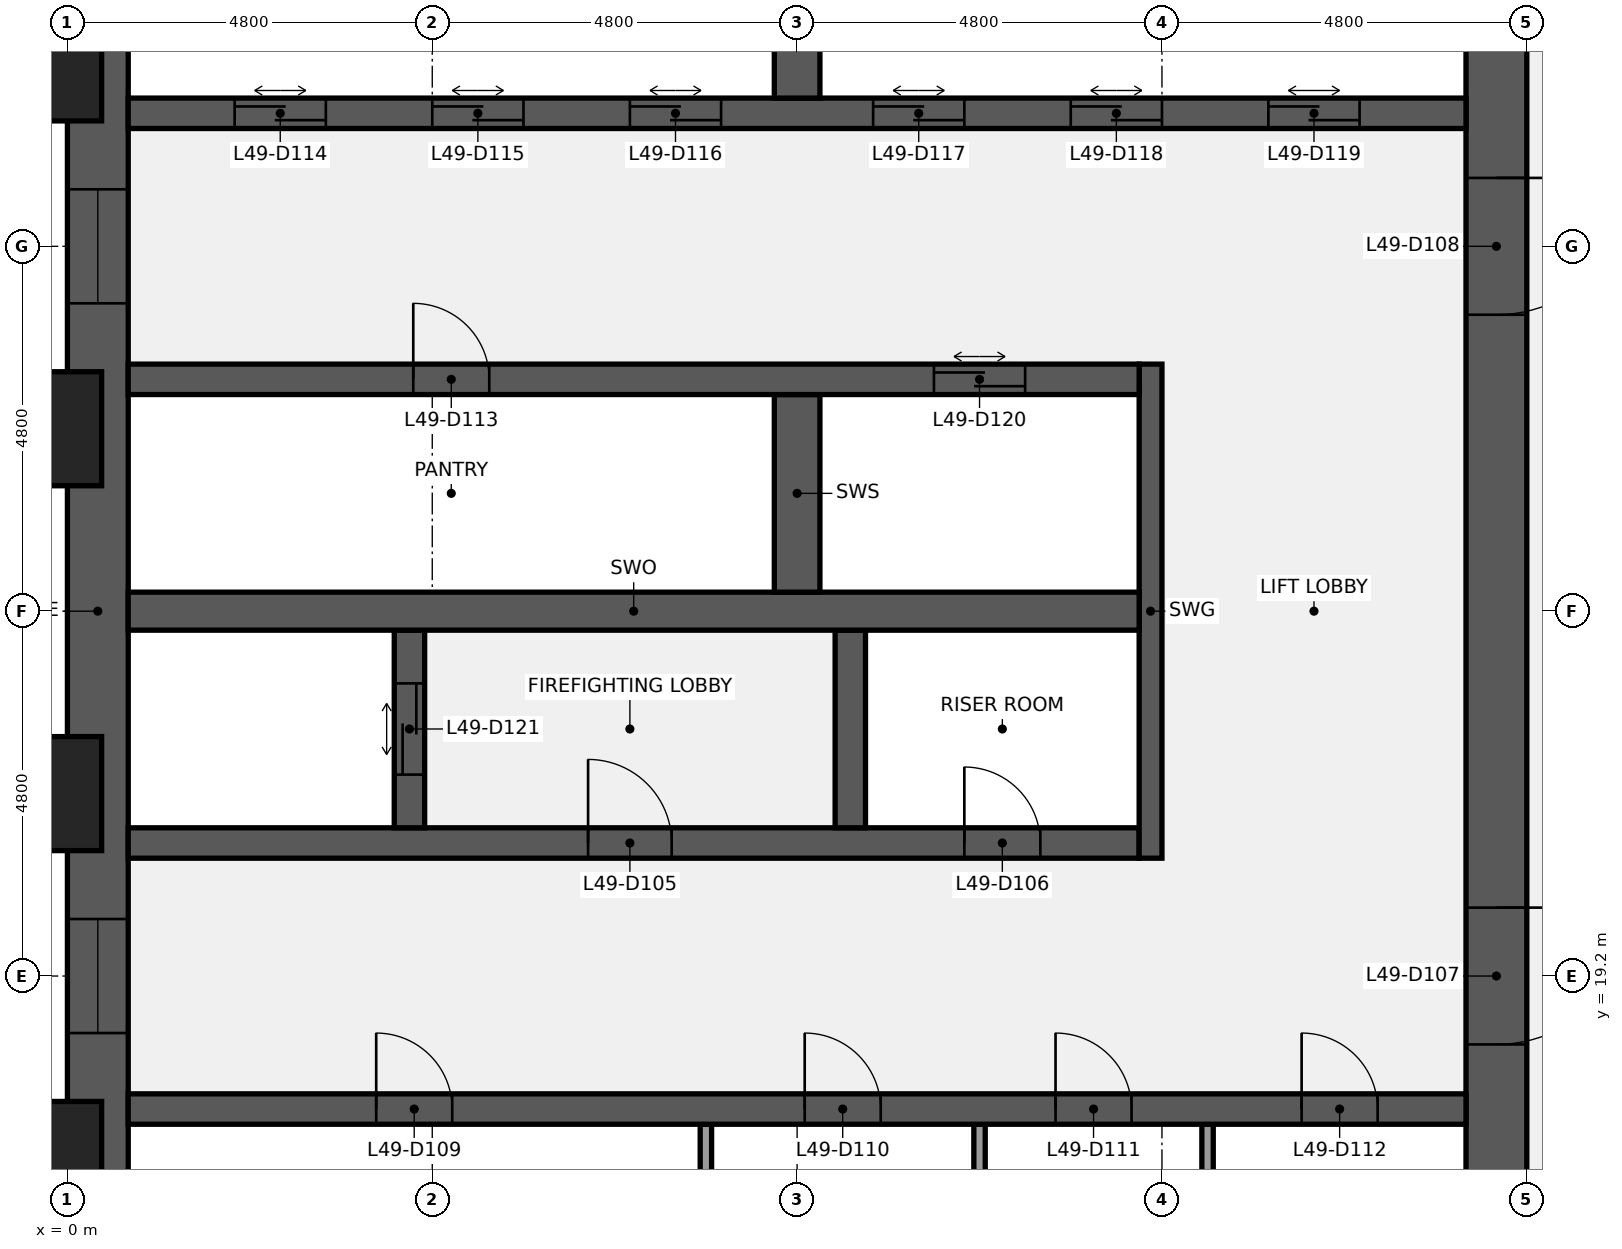
"""IFC4 building model, lengths in metres.
Left out: names, types, materials, properties, quantities, classifications, styles, units other than length and angle.
Written with IfcOpenShell. Run it as: python <this file> out.ifc"""

import sys

from ifc_helpers import new_model, si_unit, direction, frame, frame_2d, origin, origin_2d, place, context, subcontext, project, spatial, rectangle, extrude, element, fill, save


model = new_model("IFC4")
c1 = context("Model", 3, precision=1e-05, world=origin(), true_north=direction((0.0, 1.0)))
c2 = subcontext(c1, "Body", "Model", "MODEL_VIEW")
j1 = project(units=[si_unit("LENGTHUNIT", "METRE"), si_unit("PLANEANGLEUNIT", "RADIAN")], contexts=[c1])
p1 = place(None, origin())
s1 = spatial("IfcSite", under=j1, at=p1, CompositionType="ELEMENT")
p2 = place(p1, origin())
s2 = spatial("IfcBuilding", under=s1, at=p2, CompositionType="ELEMENT")
p3 = place(p2, frame((0.0, 0.0, 225.2)))
s3 = spatial("IfcBuildingStorey", under=s2, at=p3, CompositionType="ELEMENT", Elevation=225.2)
p4 = place(p3, frame((0.4, 9.6, 0.0), z_axis=(0.0, 0.0, 1.0), x_axis=(0.0, 1.0, 0.0)))
e1 = element("IfcWall", 1, at=p4, inside=s3, PredefinedType="SHEAR", context=c2, shape_type="SweptSolid", body=[
    extrude(rectangle(XDim=28.8, YDim=0.8, at=frame_2d((14.4, 0.0))), origin(), (0.0, 0.0, 1.0), 3.84),
])
p5 = place(p4, frame((8.85, 0.0, 0.9)))
e2 = element("IfcOpeningElement", 2, at=p5, cuts=e1, PredefinedType="OPENING", context=c2, shape_type="SweptSolid", body=[
    extrude(rectangle(XDim=1.5, YDim=1.5, at=frame_2d((0.75, 0.75))), frame((0.0, 0.41, 0.0), z_axis=(0.0, -1.0, 0.0), x_axis=(1.0, 0.0, 0.0)), (0.0, 0.0, 1.0), 0.82),
])
p6 = place(p4, frame((18.45, 0.0, 0.9)))
e3 = element("IfcOpeningElement", 3, at=p6, cuts=e1, PredefinedType="OPENING", context=c2, shape_type="SweptSolid", body=[
    extrude(rectangle(XDim=1.5, YDim=1.5, at=frame_2d((0.75, 0.75))), frame((0.0, 0.41, 0.0), z_axis=(0.0, -1.0, 0.0), x_axis=(1.0, 0.0, 0.0)), (0.0, 0.0, 1.0), 0.82),
])
p7 = place(p3, frame((18.8, 38.4, 0.0), z_axis=(0.0, 0.0, 1.0), x_axis=(0.0, -1.0, 0.0)))
e4 = element("IfcWall", 4, at=p7, inside=s3, PredefinedType="SHEAR", context=c2, shape_type="SweptSolid", body=[
    extrude(rectangle(XDim=28.8, YDim=0.8, at=frame_2d((14.4, 0.0))), origin(), (0.0, 0.0, 1.0), 3.84),
])
p8 = place(p7, frame((18.3, 0.0, 0.0)))
e5 = element("IfcOpeningElement", 5, at=p8, cuts=e4, PredefinedType="OPENING", context=c2, shape_type="SweptSolid", body=[
    extrude(rectangle(XDim=1.8, YDim=2.1, at=frame_2d((0.9, 1.05))), frame((0.0, 0.41, 0.0), z_axis=(0.0, -1.0, 0.0), x_axis=(1.0, 0.0, 0.0)), (0.0, 0.0, 1.0), 0.82),
])
p9 = place(p7, frame((8.7, 0.0, 0.0)))
e6 = element("IfcOpeningElement", 6, at=p9, cuts=e4, PredefinedType="OPENING", context=c2, shape_type="SweptSolid", body=[
    extrude(rectangle(XDim=1.8, YDim=2.1, at=frame_2d((0.9, 1.05))), frame((0.0, 0.41, 0.0), z_axis=(0.0, -1.0, 0.0), x_axis=(1.0, 0.0, 0.0)), (0.0, 0.0, 1.0), 0.82),
])
for number, where, z_axis, x_axis in (
    (7, (8.4, 14.65, 0.0), (0.0, 0.0, 1.0), (0.0, 1.0, 0.0)),
    (8, (12.0, 14.65, 0.0), (0.0, 0.0, 1.0), (0.0, 1.0, 0.0)),
    (9, (15.0, 14.65, 0.0), (0.0, 0.0, 1.0), (0.0, 1.0, 0.0)),
):
    element("IfcWall", number, at=place(p3, frame(where, z_axis=z_axis, x_axis=x_axis)), inside=s3, PredefinedType="PARTITIONING", context=c2, shape_type="SweptSolid", body=[
        extrude(rectangle(XDim=2.6, YDim=0.15, at=frame_2d((1.3, 0.0))), origin(), (0.0, 0.0, 1.0), 3.84),
    ])
p10 = place(p3, frame((0.8, 17.45, 0.0), z_axis=(0.0, 0.0, 1.0), x_axis=(1.0, 0.0, 0.0)))
e10 = element("IfcWall", 10, at=p10, inside=s3, PredefinedType="SHEAR", context=c2, shape_type="SweptSolid", body=[
    extrude(rectangle(XDim=17.6, YDim=0.4, at=frame_2d((8.8, 0.0))), origin(), (0.0, 0.0, 1.0), 3.84),
])
p11 = place(p10, frame((3.262, 0.0, 0.0)))
e11 = element("IfcOpeningElement", 11, at=p11, cuts=e10, PredefinedType="OPENING", context=c2, shape_type="SweptSolid", body=[
    extrude(rectangle(XDim=1.0, YDim=2.1, at=frame_2d((0.5, 1.05))), frame((0.0, 0.21, 0.0), z_axis=(0.0, -1.0, 0.0), x_axis=(1.0, 0.0, 0.0)), (0.0, 0.0, 1.0), 0.42),
])
p12 = place(p10, frame((8.9, 0.0, 0.0)))
e12 = element("IfcOpeningElement", 12, at=p12, cuts=e10, PredefinedType="OPENING", context=c2, shape_type="SweptSolid", body=[
    extrude(rectangle(XDim=1.0, YDim=2.1, at=frame_2d((0.5, 1.05))), frame((0.0, 0.21, 0.0), z_axis=(0.0, -1.0, 0.0), x_axis=(1.0, 0.0, 0.0)), (0.0, 0.0, 1.0), 0.42),
])
p13 = place(p10, frame((12.2, 0.0, 0.0)))
e13 = element("IfcOpeningElement", 13, at=p13, cuts=e10, PredefinedType="OPENING", context=c2, shape_type="SweptSolid", body=[
    extrude(rectangle(XDim=1.0, YDim=2.1, at=frame_2d((0.5, 1.05))), frame((0.0, 0.21, 0.0), z_axis=(0.0, -1.0, 0.0), x_axis=(1.0, 0.0, 0.0)), (0.0, 0.0, 1.0), 0.42),
])
p14 = place(p10, frame((15.438, 0.0, 0.0)))
e14 = element("IfcOpeningElement", 14, at=p14, cuts=e10, PredefinedType="OPENING", context=c2, shape_type="SweptSolid", body=[
    extrude(rectangle(XDim=1.0, YDim=2.1, at=frame_2d((0.5, 1.05))), frame((0.0, 0.21, 0.0), z_axis=(0.0, -1.0, 0.0), x_axis=(1.0, 0.0, 0.0)), (0.0, 0.0, 1.0), 0.42),
])
p15 = place(p3, frame((0.8, 20.95, 0.0), z_axis=(0.0, 0.0, 1.0), x_axis=(1.0, 0.0, 0.0)))
e15 = element("IfcWall", 15, at=p15, inside=s3, PredefinedType="SHEAR", context=c2, shape_type="SweptSolid", body=[
    extrude(rectangle(XDim=13.3, YDim=0.4, at=frame_2d((6.65, 0.0))), origin(), (0.0, 0.0, 1.0), 3.84),
])
p16 = place(p15, frame((6.05, 0.0, 0.0)))
e16 = element("IfcOpeningElement", 16, at=p16, cuts=e15, PredefinedType="OPENING", context=c2, shape_type="SweptSolid", body=[
    extrude(rectangle(XDim=1.1, YDim=2.1, at=frame_2d((0.55, 1.05))), frame((0.0, 0.21, 0.0), z_axis=(0.0, -1.0, 0.0), x_axis=(1.0, 0.0, 0.0)), (0.0, 0.0, 1.0), 0.42),
])
p17 = place(p15, frame((11.0, 0.0, 0.0)))
e17 = element("IfcOpeningElement", 17, at=p17, cuts=e15, PredefinedType="OPENING", context=c2, shape_type="SweptSolid", body=[
    extrude(rectangle(XDim=1.0, YDim=2.1, at=frame_2d((0.5, 1.05))), frame((0.0, 0.21, 0.0), z_axis=(0.0, -1.0, 0.0), x_axis=(1.0, 0.0, 0.0)), (0.0, 0.0, 1.0), 0.42),
])
p18 = place(p3, frame((14.25, 20.75, 0.0), z_axis=(0.0, 0.0, 1.0), x_axis=(0.0, 1.0, 0.0)))
e18 = element("IfcWall", 18, at=p18, inside=s3, PredefinedType="SHEAR", context=c2, shape_type="SweptSolid", body=[
    extrude(rectangle(XDim=6.5, YDim=0.3, at=frame_2d((3.25, 0.0))), origin(), (0.0, 0.0, 1.0), 3.84),
])
p19 = place(p3, frame((4.5, 21.15, 0.0), z_axis=(0.0, 0.0, 1.0), x_axis=(0.0, 1.0, 0.0)))
e19 = element("IfcWall", 19, at=p19, inside=s3, PredefinedType="SHEAR", context=c2, shape_type="SweptSolid", body=[
    extrude(rectangle(XDim=2.6, YDim=0.4, at=frame_2d((1.3, 0.0))), origin(), (0.0, 0.0, 1.0), 3.84),
])
p20 = place(p19, frame((0.7, 0.0, 0.0)))
e20 = element("IfcOpeningElement", 20, at=p20, cuts=e19, PredefinedType="OPENING", context=c2, shape_type="SweptSolid", body=[
    extrude(rectangle(XDim=1.2, YDim=2.1, at=frame_2d((0.6, 1.05))), frame((0.0, 0.21, 0.0), z_axis=(0.0, -1.0, 0.0), x_axis=(1.0, 0.0, 0.0)), (0.0, 0.0, 1.0), 0.42),
])
p21 = place(p3, frame((10.3, 21.15, 0.0), z_axis=(0.0, 0.0, 1.0), x_axis=(0.0, 1.0, 0.0)))
e21 = element("IfcWall", 21, at=p21, inside=s3, PredefinedType="SHEAR", context=c2, shape_type="SweptSolid", body=[
    extrude(rectangle(XDim=2.6, YDim=0.4, at=frame_2d((1.3, 0.0))), origin(), (0.0, 0.0, 1.0), 3.84),
])
p22 = place(p3, frame((0.8, 24.0, 0.0), z_axis=(0.0, 0.0, 1.0), x_axis=(1.0, 0.0, 0.0)))
e22 = element("IfcWall", 22, at=p22, inside=s3, PredefinedType="SHEAR", context=c2, shape_type="SweptSolid", body=[
    extrude(rectangle(XDim=13.3, YDim=0.5, at=frame_2d((6.65, 0.0))), origin(), (0.0, 0.0, 1.0), 3.84),
])
p23 = place(p3, frame((9.6, 24.25, 0.0), z_axis=(0.0, 0.0, 1.0), x_axis=(0.0, 1.0, 0.0)))
e23 = element("IfcWall", 23, at=p23, inside=s3, PredefinedType="SHEAR", context=c2, shape_type="SweptSolid", body=[
    extrude(rectangle(XDim=2.6, YDim=0.6, at=frame_2d((1.3, 0.0))), origin(), (0.0, 0.0, 1.0), 3.84),
])
p24 = place(p3, frame((0.8, 27.05, 0.0), z_axis=(0.0, 0.0, 1.0), x_axis=(1.0, 0.0, 0.0)))
e24 = element("IfcWall", 24, at=p24, inside=s3, PredefinedType="SHEAR", context=c2, shape_type="SweptSolid", body=[
    extrude(rectangle(XDim=13.3, YDim=0.4, at=frame_2d((6.65, 0.0))), origin(), (0.0, 0.0, 1.0), 3.84),
])
p25 = place(p24, frame((3.75, 0.0, 0.0)))
e25 = element("IfcOpeningElement", 25, at=p25, cuts=e24, PredefinedType="OPENING", context=c2, shape_type="SweptSolid", body=[
    extrude(rectangle(XDim=1.0, YDim=2.1, at=frame_2d((0.5, 1.05))), frame((0.0, 0.21, 0.0), z_axis=(0.0, -1.0, 0.0), x_axis=(1.0, 0.0, 0.0)), (0.0, 0.0, 1.0), 0.42),
])
p26 = place(p24, frame((10.6, 0.0, 0.0)))
e26 = element("IfcOpeningElement", 26, at=p26, cuts=e24, PredefinedType="OPENING", context=c2, shape_type="SweptSolid", body=[
    extrude(rectangle(XDim=1.2, YDim=2.1, at=frame_2d((0.6, 1.05))), frame((0.0, 0.21, 0.0), z_axis=(0.0, -1.0, 0.0), x_axis=(1.0, 0.0, 0.0)), (0.0, 0.0, 1.0), 0.42),
])
p27 = place(p3, frame((0.8, 30.55, 0.0), z_axis=(0.0, 0.0, 1.0), x_axis=(1.0, 0.0, 0.0)))
e27 = element("IfcWall", 27, at=p27, inside=s3, PredefinedType="SHEAR", context=c2, shape_type="SweptSolid", body=[
    extrude(rectangle(XDim=17.6, YDim=0.4, at=frame_2d((8.8, 0.0))), origin(), (0.0, 0.0, 1.0), 3.84),
])
p28 = place(p27, frame((1.4, 0.0, 0.0)))
e28 = element("IfcOpeningElement", 28, at=p28, cuts=e27, PredefinedType="OPENING", context=c2, shape_type="SweptSolid", body=[
    extrude(rectangle(XDim=1.2, YDim=2.1, at=frame_2d((0.6, 1.05))), frame((0.0, 0.21, 0.0), z_axis=(0.0, -1.0, 0.0), x_axis=(1.0, 0.0, 0.0)), (0.0, 0.0, 1.0), 0.42),
])
p29 = place(p27, frame((4.0, 0.0, 0.0)))
e29 = element("IfcOpeningElement", 29, at=p29, cuts=e27, PredefinedType="OPENING", context=c2, shape_type="SweptSolid", body=[
    extrude(rectangle(XDim=1.2, YDim=2.1, at=frame_2d((0.6, 1.05))), frame((0.0, 0.21, 0.0), z_axis=(0.0, -1.0, 0.0), x_axis=(1.0, 0.0, 0.0)), (0.0, 0.0, 1.0), 0.42),
])
p30 = place(p27, frame((6.6, 0.0, 0.0)))
e30 = element("IfcOpeningElement", 30, at=p30, cuts=e27, PredefinedType="OPENING", context=c2, shape_type="SweptSolid", body=[
    extrude(rectangle(XDim=1.2, YDim=2.1, at=frame_2d((0.6, 1.05))), frame((0.0, 0.21, 0.0), z_axis=(0.0, -1.0, 0.0), x_axis=(1.0, 0.0, 0.0)), (0.0, 0.0, 1.0), 0.42),
])
p31 = place(p27, frame((9.8, 0.0, 0.0)))
e31 = element("IfcOpeningElement", 31, at=p31, cuts=e27, PredefinedType="OPENING", context=c2, shape_type="SweptSolid", body=[
    extrude(rectangle(XDim=1.2, YDim=2.1, at=frame_2d((0.6, 1.05))), frame((0.0, 0.21, 0.0), z_axis=(0.0, -1.0, 0.0), x_axis=(1.0, 0.0, 0.0)), (0.0, 0.0, 1.0), 0.42),
])
p32 = place(p27, frame((12.4, 0.0, 0.0)))
e32 = element("IfcOpeningElement", 32, at=p32, cuts=e27, PredefinedType="OPENING", context=c2, shape_type="SweptSolid", body=[
    extrude(rectangle(XDim=1.2, YDim=2.1, at=frame_2d((0.6, 1.05))), frame((0.0, 0.21, 0.0), z_axis=(0.0, -1.0, 0.0), x_axis=(1.0, 0.0, 0.0)), (0.0, 0.0, 1.0), 0.42),
])
p33 = place(p27, frame((15.0, 0.0, 0.0)))
e33 = element("IfcOpeningElement", 33, at=p33, cuts=e27, PredefinedType="OPENING", context=c2, shape_type="SweptSolid", body=[
    extrude(rectangle(XDim=1.2, YDim=2.1, at=frame_2d((0.6, 1.05))), frame((0.0, 0.21, 0.0), z_axis=(0.0, -1.0, 0.0), x_axis=(1.0, 0.0, 0.0)), (0.0, 0.0, 1.0), 0.42),
])
p34 = place(p3, frame((9.6, 30.75, 0.0), z_axis=(0.0, 0.0, 1.0), x_axis=(0.0, 1.0, 0.0)))
e34 = element("IfcWall", 34, at=p34, inside=s3, PredefinedType="SHEAR", context=c2, shape_type="SweptSolid", body=[
    extrude(rectangle(XDim=2.6, YDim=0.6, at=frame_2d((1.3, 0.0))), origin(), (0.0, 0.0, 1.0), 3.84),
])
for number, where, z_axis, x_axis in (
    (35, (-0.75, 16.8, 0.0), (0.0, 0.0, 1.0), (0.0, 1.0, 0.0)),
    (36, (-0.75, 21.6, 0.0), (0.0, 0.0, 1.0), (0.0, 1.0, 0.0)),
    (37, (-0.75, 26.4, 0.0), (0.0, 0.0, 1.0), (0.0, 1.0, 0.0)),
    (38, (-0.75, 31.2, 0.0), (0.0, 0.0, 1.0), (0.0, 1.0, 0.0)),
):
    element("IfcColumn", number, at=place(p3, frame(where, z_axis=z_axis, x_axis=x_axis)), inside=s3, PredefinedType="PILASTER", context=c2, shape_type="SweptSolid", body=[
        extrude(rectangle(XDim=2.4, YDim=1.5, at=origin_2d()), origin(), (0.0, 0.0, 1.0), 4.0),
    ])
p35 = place(p16, origin())
e39 = element("IfcDoor", 39, at=p35, inside=s3, OperationType="SINGLE_SWING_LEFT", PredefinedType="DOOR", context=c2, shape_type="SweptSolid", body=[
    extrude(rectangle(XDim=1.1, YDim=2.1, at=frame_2d((0.55, 1.05))), frame((0.0, 0.025, 0.0), z_axis=(0.0, -1.0, 0.0), x_axis=(1.0, 0.0, 0.0)), (0.0, 0.0, 1.0), 0.05),
])
fill(e16, e39)
p36 = place(p17, origin())
e40 = element("IfcDoor", 40, at=p36, inside=s3, OperationType="SINGLE_SWING_LEFT", PredefinedType="DOOR", context=c2, shape_type="SweptSolid", body=[
    extrude(rectangle(XDim=1.0, YDim=2.1, at=frame_2d((0.5, 1.05))), frame((0.0, 0.025, 0.0), z_axis=(0.0, -1.0, 0.0), x_axis=(1.0, 0.0, 0.0)), (0.0, 0.0, 1.0), 0.05),
])
fill(e17, e40)
p37 = place(p8, origin())
e41 = element("IfcDoor", 41, at=p37, inside=s3, OperationType="DOUBLE_DOOR_SINGLE_SWING", PredefinedType="DOOR", context=c2, shape_type="SweptSolid", body=[
    extrude(rectangle(XDim=1.8, YDim=2.1, at=frame_2d((0.9, 1.05))), frame((0.0, 0.025, 0.0), z_axis=(0.0, -1.0, 0.0), x_axis=(1.0, 0.0, 0.0)), (0.0, 0.0, 1.0), 0.05),
])
fill(e5, e41)
p38 = place(p9, origin())
e42 = element("IfcDoor", 42, at=p38, inside=s3, OperationType="DOUBLE_DOOR_SINGLE_SWING", PredefinedType="DOOR", context=c2, shape_type="SweptSolid", body=[
    extrude(rectangle(XDim=1.8, YDim=2.1, at=frame_2d((0.9, 1.05))), frame((0.0, 0.025, 0.0), z_axis=(0.0, -1.0, 0.0), x_axis=(1.0, 0.0, 0.0)), (0.0, 0.0, 1.0), 0.05),
])
fill(e6, e42)
p39 = place(p11, origin())
e43 = element("IfcDoor", 43, at=p39, inside=s3, OperationType="SINGLE_SWING_LEFT", PredefinedType="DOOR", context=c2, shape_type="SweptSolid", body=[
    extrude(rectangle(XDim=1.0, YDim=2.1, at=frame_2d((0.5, 1.05))), frame((0.0, 0.025, 0.0), z_axis=(0.0, -1.0, 0.0), x_axis=(1.0, 0.0, 0.0)), (0.0, 0.0, 1.0), 0.05),
])
fill(e11, e43)
p40 = place(p12, origin())
e44 = element("IfcDoor", 44, at=p40, inside=s3, OperationType="SINGLE_SWING_LEFT", PredefinedType="DOOR", context=c2, shape_type="SweptSolid", body=[
    extrude(rectangle(XDim=1.0, YDim=2.1, at=frame_2d((0.5, 1.05))), frame((0.0, 0.025, 0.0), z_axis=(0.0, -1.0, 0.0), x_axis=(1.0, 0.0, 0.0)), (0.0, 0.0, 1.0), 0.05),
])
fill(e12, e44)
p41 = place(p13, origin())
e45 = element("IfcDoor", 45, at=p41, inside=s3, OperationType="SINGLE_SWING_LEFT", PredefinedType="DOOR", context=c2, shape_type="SweptSolid", body=[
    extrude(rectangle(XDim=1.0, YDim=2.1, at=frame_2d((0.5, 1.05))), frame((0.0, 0.025, 0.0), z_axis=(0.0, -1.0, 0.0), x_axis=(1.0, 0.0, 0.0)), (0.0, 0.0, 1.0), 0.05),
])
fill(e13, e45)
p42 = place(p14, origin())
e46 = element("IfcDoor", 46, at=p42, inside=s3, OperationType="SINGLE_SWING_LEFT", PredefinedType="DOOR", context=c2, shape_type="SweptSolid", body=[
    extrude(rectangle(XDim=1.0, YDim=2.1, at=frame_2d((0.5, 1.05))), frame((0.0, 0.025, 0.0), z_axis=(0.0, -1.0, 0.0), x_axis=(1.0, 0.0, 0.0)), (0.0, 0.0, 1.0), 0.05),
])
fill(e14, e46)
p43 = place(p25, origin())
e47 = element("IfcDoor", 47, at=p43, inside=s3, OperationType="SINGLE_SWING_LEFT", PredefinedType="DOOR", context=c2, shape_type="SweptSolid", body=[
    extrude(rectangle(XDim=1.0, YDim=2.1, at=frame_2d((0.5, 1.05))), frame((0.0, 0.025, 0.0), z_axis=(0.0, -1.0, 0.0), x_axis=(1.0, 0.0, 0.0)), (0.0, 0.0, 1.0), 0.05),
])
fill(e25, e47)
p44 = place(p28, origin())
e48 = element("IfcDoor", 48, at=p44, inside=s3, OperationType="DOUBLE_DOOR_SLIDING", PredefinedType="DOOR", context=c2, shape_type="SweptSolid", body=[
    extrude(rectangle(XDim=1.2, YDim=2.1, at=frame_2d((0.6, 1.05))), frame((0.0, 0.025, 0.0), z_axis=(0.0, -1.0, 0.0), x_axis=(1.0, 0.0, 0.0)), (0.0, 0.0, 1.0), 0.05),
])
fill(e28, e48)
p45 = place(p29, origin())
e49 = element("IfcDoor", 49, at=p45, inside=s3, OperationType="DOUBLE_DOOR_SLIDING", PredefinedType="DOOR", context=c2, shape_type="SweptSolid", body=[
    extrude(rectangle(XDim=1.2, YDim=2.1, at=frame_2d((0.6, 1.05))), frame((0.0, 0.025, 0.0), z_axis=(0.0, -1.0, 0.0), x_axis=(1.0, 0.0, 0.0)), (0.0, 0.0, 1.0), 0.05),
])
fill(e29, e49)
p46 = place(p30, origin())
e50 = element("IfcDoor", 50, at=p46, inside=s3, OperationType="DOUBLE_DOOR_SLIDING", PredefinedType="DOOR", context=c2, shape_type="SweptSolid", body=[
    extrude(rectangle(XDim=1.2, YDim=2.1, at=frame_2d((0.6, 1.05))), frame((0.0, 0.025, 0.0), z_axis=(0.0, -1.0, 0.0), x_axis=(1.0, 0.0, 0.0)), (0.0, 0.0, 1.0), 0.05),
])
fill(e30, e50)
p47 = place(p31, origin())
e51 = element("IfcDoor", 51, at=p47, inside=s3, OperationType="DOUBLE_DOOR_SLIDING", PredefinedType="DOOR", context=c2, shape_type="SweptSolid", body=[
    extrude(rectangle(XDim=1.2, YDim=2.1, at=frame_2d((0.6, 1.05))), frame((0.0, 0.025, 0.0), z_axis=(0.0, -1.0, 0.0), x_axis=(1.0, 0.0, 0.0)), (0.0, 0.0, 1.0), 0.05),
])
fill(e31, e51)
p48 = place(p32, origin())
e52 = element("IfcDoor", 52, at=p48, inside=s3, OperationType="DOUBLE_DOOR_SLIDING", PredefinedType="DOOR", context=c2, shape_type="SweptSolid", body=[
    extrude(rectangle(XDim=1.2, YDim=2.1, at=frame_2d((0.6, 1.05))), frame((0.0, 0.025, 0.0), z_axis=(0.0, -1.0, 0.0), x_axis=(1.0, 0.0, 0.0)), (0.0, 0.0, 1.0), 0.05),
])
fill(e32, e52)
p49 = place(p33, origin())
e53 = element("IfcDoor", 53, at=p49, inside=s3, OperationType="DOUBLE_DOOR_SLIDING", PredefinedType="DOOR", context=c2, shape_type="SweptSolid", body=[
    extrude(rectangle(XDim=1.2, YDim=2.1, at=frame_2d((0.6, 1.05))), frame((0.0, 0.025, 0.0), z_axis=(0.0, -1.0, 0.0), x_axis=(1.0, 0.0, 0.0)), (0.0, 0.0, 1.0), 0.05),
])
fill(e33, e53)
p50 = place(p26, origin())
e54 = element("IfcDoor", 54, at=p50, inside=s3, OperationType="DOUBLE_DOOR_SLIDING", PredefinedType="DOOR", context=c2, shape_type="SweptSolid", body=[
    extrude(rectangle(XDim=1.2, YDim=2.1, at=frame_2d((0.6, 1.05))), frame((0.0, 0.025, 0.0), z_axis=(0.0, -1.0, 0.0), x_axis=(1.0, 0.0, 0.0)), (0.0, 0.0, 1.0), 0.05),
])
fill(e26, e54)
p51 = place(p20, origin())
e55 = element("IfcDoor", 55, at=p51, inside=s3, OperationType="DOUBLE_DOOR_SLIDING", PredefinedType="DOOR", context=c2, shape_type="SweptSolid", body=[
    extrude(rectangle(XDim=1.2, YDim=2.1, at=frame_2d((0.6, 1.05))), frame((0.0, 0.025, 0.0), z_axis=(0.0, -1.0, 0.0), x_axis=(1.0, 0.0, 0.0)), (0.0, 0.0, 1.0), 0.05),
])
fill(e20, e55)
p52 = place(p5, origin())
e56 = element("IfcWindow", 56, at=p52, inside=s3, PartitioningType="SINGLE_PANEL", PredefinedType="WINDOW", context=c2, shape_type="SweptSolid", body=[
    extrude(rectangle(XDim=1.5, YDim=1.5, at=frame_2d((0.75, 0.75))), frame((0.0, 0.03, 0.0), z_axis=(0.0, -1.0, 0.0), x_axis=(1.0, 0.0, 0.0)), (0.0, 0.0, 1.0), 0.06),
])
fill(e2, e56)
p53 = place(p6, origin())
e57 = element("IfcWindow", 57, at=p53, inside=s3, PartitioningType="SINGLE_PANEL", PredefinedType="WINDOW", context=c2, shape_type="SweptSolid", body=[
    extrude(rectangle(XDim=1.5, YDim=1.5, at=frame_2d((0.75, 0.75))), frame((0.0, 0.03, 0.0), z_axis=(0.0, -1.0, 0.0), x_axis=(1.0, 0.0, 0.0)), (0.0, 0.0, 1.0), 0.06),
])
fill(e3, e57)
save(model, sys.argv[1])
